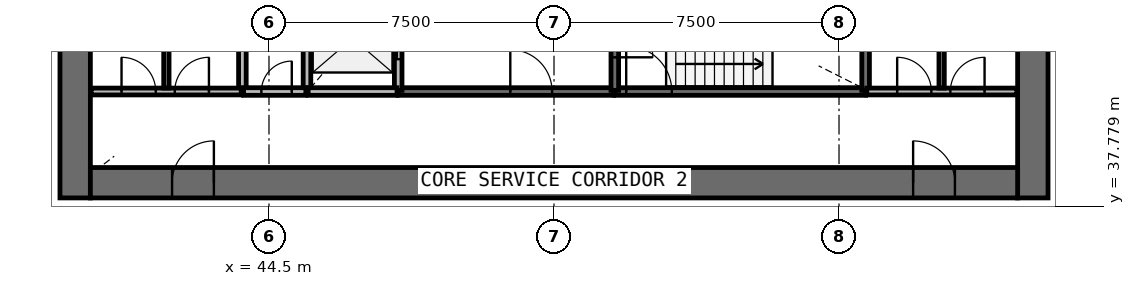
"""IFC4 building model, lengths in metres.
Left out: names, types, materials, properties, quantities, classifications, styles, units other than length and angle.
Written with IfcOpenShell. Run it as: python <this file> out.ifc"""

import sys

from ifc_helpers import new_model, si_unit, direction, frame, frame_2d, origin, place, context, subcontext, project, spatial, rectangle, extrude, source, transform, mapped, element, fill, save


model = new_model("IFC4")
c1 = context("Model", 3, precision=1e-05, world=origin(), true_north=direction((0.0, 1.0)))
c2 = subcontext(c1, "Body", "Model", "MODEL_VIEW")
j1 = project(units=[si_unit("LENGTHUNIT", "METRE"), si_unit("PLANEANGLEUNIT", "RADIAN")], contexts=[c1])
p1 = place(None, origin())
s1 = spatial("IfcSite", under=j1, at=p1, CompositionType="ELEMENT")
p2 = place(p1, origin())
s2 = spatial("IfcBuilding", under=s1, at=p2, CompositionType="ELEMENT")
p3 = place(p2, frame((0.0, 0.0, 88.0)))
s3 = spatial("IfcBuildingStorey", under=s2, at=p3, CompositionType="ELEMENT", Elevation=88.0)
p4 = place(p3, frame((64.6, 38.0, 0.0), z_axis=(0.0, 0.0, 1.0), x_axis=(0.0, 1.0, 0.0)))
e1 = element("IfcWall", 1, at=p4, inside=s3, PredefinedType="SHEAR", context=c2, shape_type="SweptSolid", body=[
    extrude(rectangle(XDim=20.0, YDim=0.8, at=frame_2d((10.0, 0.0))), origin(), (0.0, 0.0, 1.0), 4.1),
])
p5 = place(p4, frame((9.1, 0.0, 0.0)))
e2 = element("IfcOpeningElement", 2, at=p5, cuts=e1, PredefinedType="OPENING", context=c2, shape_type="SweptSolid", body=[
    extrude(rectangle(XDim=1.8, YDim=2.1, at=frame_2d((0.9, 1.05))), frame((0.0, 0.41, 0.0), z_axis=(0.0, -1.0, 0.0), x_axis=(1.0, 0.0, 0.0)), (0.0, 0.0, 1.0), 0.82),
])
p6 = place(p3, frame((39.4, 58.0, 0.0), z_axis=(0.0, 0.0, 1.0), x_axis=(0.0, -1.0, 0.0)))
e3 = element("IfcWall", 3, at=p6, inside=s3, PredefinedType="SHEAR", context=c2, shape_type="SweptSolid", body=[
    extrude(rectangle(XDim=20.0, YDim=0.8, at=frame_2d((10.0, 0.0))), origin(), (0.0, 0.0, 1.0), 4.1),
])
p7 = place(p6, frame((9.1, 0.0, 0.0)))
e4 = element("IfcOpeningElement", 4, at=p7, cuts=e3, PredefinedType="OPENING", context=c2, shape_type="SweptSolid", body=[
    extrude(rectangle(XDim=1.8, YDim=2.1, at=frame_2d((0.9, 1.05))), frame((0.0, 0.41, 0.0), z_axis=(0.0, -1.0, 0.0), x_axis=(1.0, 0.0, 0.0)), (0.0, 0.0, 1.0), 0.82),
])
p8 = place(p3, frame((39.8, 38.4, 0.0), z_axis=(0.0, 0.0, 1.0), x_axis=(1.0, 0.0, 0.0)))
e5 = element("IfcWall", 5, at=p8, inside=s3, PredefinedType="SHEAR", context=c2, shape_type="SweptSolid", body=[
    extrude(rectangle(XDim=24.4, YDim=0.8, at=frame_2d((12.2, 0.0))), origin(), (0.0, 0.0, 1.0), 4.1),
])
p9 = place(p8, frame((21.65, 0.0, 0.0)))
e6 = element("IfcOpeningElement", 6, at=p9, cuts=e5, PredefinedType="OPENING", context=c2, shape_type="SweptSolid", body=[
    extrude(rectangle(XDim=1.1, YDim=2.1, at=frame_2d((0.55, 1.05))), frame((0.0, 0.41, 0.0), z_axis=(0.0, -1.0, 0.0), x_axis=(1.0, 0.0, 0.0)), (0.0, 0.0, 1.0), 0.82),
])
p10 = place(p8, frame((2.15, 0.0, 0.0)))
e7 = element("IfcOpeningElement", 7, at=p10, cuts=e5, PredefinedType="OPENING", context=c2, shape_type="SweptSolid", body=[
    extrude(rectangle(XDim=1.1, YDim=2.1, at=frame_2d((0.55, 1.05))), frame((0.0, 0.41, 0.0), z_axis=(0.0, -1.0, 0.0), x_axis=(1.0, 0.0, 0.0)), (0.0, 0.0, 1.0), 0.82),
])
p11 = place(p3, frame((53.6, 40.8, 0.0), z_axis=(0.0, 0.0, 1.0), x_axis=(1.0, 0.0, 0.0)))
e8 = element("IfcWall", 8, at=p11, inside=s3, PredefinedType="SOLIDWALL", context=c2, shape_type="SweptSolid", body=[
    extrude(rectangle(XDim=6.6, YDim=0.2, at=frame_2d((3.3, 0.0))), origin(), (0.0, 0.0, 1.0), 3.7),
])
p12 = place(p11, frame((0.3, 0.0, 0.0)))
e9 = element("IfcOpeningElement", 9, at=p12, cuts=e8, PredefinedType="OPENING", context=c2, shape_type="SweptSolid", body=[
    extrude(rectangle(XDim=1.2, YDim=2.1, at=frame_2d((0.6, 1.05))), frame((0.0, 0.11, 0.0), z_axis=(0.0, -1.0, 0.0), x_axis=(1.0, 0.0, 0.0)), (0.0, 0.0, 1.0), 0.22),
])
p13 = place(p3, frame((47.9, 40.8, 0.0), z_axis=(0.0, 0.0, 1.0), x_axis=(1.0, 0.0, 0.0)))
e10 = element("IfcWall", 10, at=p13, inside=s3, PredefinedType="SOLIDWALL", context=c2, shape_type="SweptSolid", body=[
    extrude(rectangle(XDim=5.67, YDim=0.2, at=frame_2d((2.835, 0.0))), origin(), (0.0, 0.0, 1.0), 3.7),
])
p14 = place(p13, frame((2.95, 0.0, 0.0)))
e11 = element("IfcOpeningElement", 11, at=p14, cuts=e10, PredefinedType="OPENING", context=c2, shape_type="SweptSolid", body=[
    extrude(rectangle(XDim=1.1, YDim=2.1, at=frame_2d((0.55, 1.05))), frame((0.0, 0.11, 0.0), z_axis=(0.0, -1.0, 0.0), x_axis=(1.0, 0.0, 0.0)), (0.0, 0.0, 1.0), 0.22),
])
for number, where, z_axis, x_axis in (
    (12, (43.8, 43.6, 0.0), (0.0, 0.0, 1.0), (0.0, -1.0, 0.0)),
    (13, (45.5, 43.6, 0.0), (0.0, 0.0, 1.0), (0.0, -1.0, 0.0)),
):
    element("IfcWall", number, at=place(p3, frame(where, z_axis=z_axis, x_axis=x_axis)), inside=s3, PredefinedType="SOLIDWALL", context=c2, shape_type="SweptSolid", body=[
        extrude(rectangle(XDim=2.8, YDim=0.2, at=frame_2d((1.4, 0.0))), origin(), (0.0, 0.0, 1.0), 3.7),
    ])
p15 = place(p3, frame((47.9, 40.83, 0.0), z_axis=(0.0, 0.0, 1.0), x_axis=(0.0, 1.0, 0.0)))
e14 = element("IfcWall", 14, at=p15, inside=s3, PredefinedType="SOLIDWALL", context=c2, shape_type="SweptSolid", body=[
    extrude(rectangle(XDim=2.77, YDim=0.2, at=frame_2d((1.385, 0.0))), origin(), (0.0, 0.0, 1.0), 3.7),
])
p16 = place(p15, frame((0.82, 0.0, 0.0)))
e15 = element("IfcOpeningElement", 15, at=p16, cuts=e14, PredefinedType="OPENING", context=c2, shape_type="SweptSolid", body=[
    extrude(rectangle(XDim=1.1, YDim=2.1, at=frame_2d((0.55, 1.05))), frame((0.0, 0.11, 0.0), z_axis=(0.0, -1.0, 0.0), x_axis=(1.0, 0.0, 0.0)), (0.0, 0.0, 1.0), 0.22),
])
p17 = place(p3, frame((60.2, 40.83, 0.0), z_axis=(0.0, 0.0, 1.0), x_axis=(0.0, 1.0, 0.0)))
e16 = element("IfcWall", 16, at=p17, inside=s3, PredefinedType="SOLIDWALL", context=c2, shape_type="SweptSolid", body=[
    extrude(rectangle(XDim=2.77, YDim=0.2, at=frame_2d((1.385, 0.0))), origin(), (0.0, 0.0, 1.0), 3.7),
])
p18 = place(p3, frame((53.6, 43.6, 0.0), z_axis=(0.0, 0.0, 1.0), x_axis=(0.0, -1.0, 0.0)))
e17 = element("IfcWall", 17, at=p18, inside=s3, PredefinedType="SOLIDWALL", context=c2, shape_type="SweptSolid", body=[
    extrude(rectangle(XDim=2.77, YDim=0.2, at=frame_2d((1.385, 0.0))), origin(), (0.0, 0.0, 1.0), 3.7),
])
p19 = place(p18, frame((0.9, 0.0, 0.0)))
e18 = element("IfcOpeningElement", 18, at=p19, cuts=e17, PredefinedType="OPENING", context=c2, shape_type="SweptSolid", body=[
    extrude(rectangle(XDim=1.0, YDim=2.1, at=frame_2d((0.5, 1.05))), frame((0.0, 0.11, 0.0), z_axis=(0.0, -1.0, 0.0), x_axis=(1.0, 0.0, 0.0)), (0.0, 0.0, 1.0), 0.22),
])
p20 = place(p3, frame((45.53, 40.8, 0.0), z_axis=(0.0, 0.0, 1.0), x_axis=(1.0, 0.0, 0.0)))
e19 = element("IfcWall", 19, at=p20, inside=s3, PredefinedType="SOLIDWALL", context=c2, shape_type="SweptSolid", body=[
    extrude(rectangle(XDim=2.34, YDim=0.2, at=frame_2d((1.17, 0.0))), origin(), (0.0, 0.0, 1.0), 3.7),
])
p21 = place(p3, frame((43.83, 40.8, 0.0), z_axis=(0.0, 0.0, 1.0), x_axis=(1.0, 0.0, 0.0)))
e20 = element("IfcWall", 20, at=p21, inside=s3, PredefinedType="SOLIDWALL", context=c2, shape_type="SweptSolid", body=[
    extrude(rectangle(XDim=1.64, YDim=0.2, at=frame_2d((0.82, 0.0))), origin(), (0.0, 0.0, 1.0), 3.7),
])
p22 = place(p21, frame((0.47, 0.0, 0.0)))
e21 = element("IfcOpeningElement", 21, at=p22, cuts=e20, PredefinedType="OPENING", context=c2, shape_type="SweptSolid", body=[
    extrude(rectangle(XDim=0.8, YDim=2.1, at=frame_2d((0.4, 1.05))), frame((0.0, 0.11, 0.0), z_axis=(0.0, -1.0, 0.0), x_axis=(1.0, 0.0, 0.0)), (0.0, 0.0, 1.0), 0.22),
])
p23 = place(p3, frame((60.23, 40.8, 0.0), z_axis=(0.0, 0.0, 1.0), x_axis=(1.0, 0.0, 0.0)))
e22 = element("IfcWall", 22, at=p23, inside=s3, PredefinedType="PARTITIONING", context=c2, shape_type="SweptSolid", body=[
    extrude(rectangle(XDim=3.95, YDim=0.18, at=frame_2d((1.975, 0.0))), origin(), (0.0, 0.0, 1.0), 3.7),
])
p24 = place(p23, frame((0.8, 0.0, 0.0)))
e23 = element("IfcOpeningElement", 23, at=p24, cuts=e22, PredefinedType="OPENING", context=c2, shape_type="SweptSolid", body=[
    extrude(rectangle(XDim=0.9, YDim=2.1, at=frame_2d((0.45, 1.05))), frame((0.0, 0.1, 0.0), z_axis=(0.0, -1.0, 0.0), x_axis=(1.0, 0.0, 0.0)), (0.0, 0.0, 1.0), 0.2),
])
p25 = place(p23, frame((2.2, 0.0, 0.0)))
e24 = element("IfcOpeningElement", 24, at=p25, cuts=e22, PredefinedType="OPENING", context=c2, shape_type="SweptSolid", body=[
    extrude(rectangle(XDim=0.9, YDim=2.1, at=frame_2d((0.45, 1.05))), frame((0.0, 0.1, 0.0), z_axis=(0.0, -1.0, 0.0), x_axis=(1.0, 0.0, 0.0)), (0.0, 0.0, 1.0), 0.2),
])
p26 = place(p3, frame((39.82, 40.8, 0.0), z_axis=(0.0, 0.0, 1.0), x_axis=(1.0, 0.0, 0.0)))
e25 = element("IfcWall", 25, at=p26, inside=s3, PredefinedType="PARTITIONING", context=c2, shape_type="SweptSolid", body=[
    extrude(rectangle(XDim=3.95, YDim=0.18, at=frame_2d((1.975, 0.0))), origin(), (0.0, 0.0, 1.0), 3.7),
])
p27 = place(p26, frame((0.8, 0.0, 0.0)))
e26 = element("IfcOpeningElement", 26, at=p27, cuts=e25, PredefinedType="OPENING", context=c2, shape_type="SweptSolid", body=[
    extrude(rectangle(XDim=0.9, YDim=2.1, at=frame_2d((0.45, 1.05))), frame((0.0, 0.1, 0.0), z_axis=(0.0, -1.0, 0.0), x_axis=(1.0, 0.0, 0.0)), (0.0, 0.0, 1.0), 0.2),
])
p28 = place(p26, frame((2.2, 0.0, 0.0)))
e27 = element("IfcOpeningElement", 27, at=p28, cuts=e25, PredefinedType="OPENING", context=c2, shape_type="SweptSolid", body=[
    extrude(rectangle(XDim=0.9, YDim=2.1, at=frame_2d((0.45, 1.05))), frame((0.0, 0.1, 0.0), z_axis=(0.0, -1.0, 0.0), x_axis=(1.0, 0.0, 0.0)), (0.0, 0.0, 1.0), 0.2),
])
for number, where, z_axis, x_axis in (
    (28, (41.8, 40.89, 0.0), (0.0, 0.0, 1.0), (0.0, 1.0, 0.0)),
    (29, (62.2, 40.89, 0.0), (0.0, 0.0, 1.0), (0.0, 1.0, 0.0)),
):
    element("IfcWall", number, at=place(p3, frame(where, z_axis=z_axis, x_axis=x_axis)), inside=s3, PredefinedType="PARTITIONING", context=c2, shape_type="SweptSolid", body=[
        extrude(rectangle(XDim=2.71, YDim=0.14, at=frame_2d((1.355, 0.0))), origin(), (0.0, 0.0, 1.0), 2.9),
    ])
m1 = source(origin(), c2, "Body", "SweptSolid", [
    extrude(rectangle(XDim=1.1, YDim=2.1, at=frame_2d((0.55, 1.05))), frame((0.0, 0.025, 0.0), z_axis=(0.0, -1.0, 0.0), x_axis=(1.0, 0.0, 0.0)), (0.0, 0.0, 1.0), 0.05),
])
p29 = place(p16, origin())
e30 = element("IfcDoor", 30, at=p29, inside=s3, OperationType="DOUBLE_DOOR_SLIDING", PredefinedType="USERDEFINED", context=c2, shape_type="MappedRepresentation", body=[
    mapped(m1, transform((0.0, 0.0, 0.0), scale=1.0)),
])
fill(e15, e30)
m2 = source(origin(), c2, "Body", "SweptSolid", [
    extrude(rectangle(XDim=1.2, YDim=2.1, at=frame_2d((0.6, 1.05))), frame((0.0, 0.025, 0.0), z_axis=(0.0, -1.0, 0.0), x_axis=(1.0, 0.0, 0.0)), (0.0, 0.0, 1.0), 0.05),
])
p30 = place(p12, origin())
e31 = element("IfcDoor", 31, at=p30, inside=s3, OperationType="SINGLE_SWING_LEFT", PredefinedType="DOOR", context=c2, shape_type="MappedRepresentation", body=[
    mapped(m2, transform((0.0, 0.0, 0.0), scale=1.0)),
])
fill(e9, e31)
m3 = source(origin(), c2, "Body", "SweptSolid", [
    extrude(rectangle(XDim=1.0, YDim=2.1, at=frame_2d((0.5, 1.05))), frame((0.0, 0.025, 0.0), z_axis=(0.0, -1.0, 0.0), x_axis=(1.0, 0.0, 0.0)), (0.0, 0.0, 1.0), 0.05),
])
p31 = place(p19, origin())
e32 = element("IfcDoor", 32, at=p31, inside=s3, OperationType="SINGLE_SWING_RIGHT", PredefinedType="DOOR", context=c2, shape_type="MappedRepresentation", body=[
    mapped(m3, transform((0.0, 0.0, 0.0), scale=1.0)),
])
fill(e18, e32)
m4 = source(origin(), c2, "Body", "SweptSolid", [
    extrude(rectangle(XDim=1.1, YDim=2.1, at=frame_2d((0.55, 1.05))), frame((0.0, 0.025, 0.0), z_axis=(0.0, -1.0, 0.0), x_axis=(1.0, 0.0, 0.0)), (0.0, 0.0, 1.0), 0.05),
])
p32 = place(p14, origin())
e33 = element("IfcDoor", 33, at=p32, inside=s3, OperationType="SINGLE_SWING_LEFT", PredefinedType="DOOR", context=c2, shape_type="MappedRepresentation", body=[
    mapped(m4, transform((0.0, 0.0, 0.0), scale=1.0)),
])
fill(e11, e33)
m5 = source(origin(), c2, "Body", "SweptSolid", [
    extrude(rectangle(XDim=0.8, YDim=2.1, at=frame_2d((0.4, 1.05))), frame((0.0, 0.025, 0.0), z_axis=(0.0, -1.0, 0.0), x_axis=(1.0, 0.0, 0.0)), (0.0, 0.0, 1.0), 0.05),
])
p33 = place(p22, origin())
e34 = element("IfcDoor", 34, at=p33, inside=s3, OperationType="SINGLE_SWING_RIGHT", PredefinedType="DOOR", context=c2, shape_type="MappedRepresentation", body=[
    mapped(m5, transform((0.0, 0.0, 0.0), scale=1.0)),
])
fill(e21, e34)
m6 = source(origin(), c2, "Body", "SweptSolid", [
    extrude(rectangle(XDim=1.1, YDim=2.1, at=frame_2d((0.55, 1.05))), frame((0.0, 0.025, 0.0), z_axis=(0.0, -1.0, 0.0), x_axis=(1.0, 0.0, 0.0)), (0.0, 0.0, 1.0), 0.05),
])
p34 = place(p9, origin())
e35 = element("IfcDoor", 35, at=p34, inside=s3, OperationType="SINGLE_SWING_LEFT", PredefinedType="DOOR", context=c2, shape_type="MappedRepresentation", body=[
    mapped(m6, transform((0.0, 0.0, 0.0), scale=1.0)),
])
fill(e6, e35)
p35 = place(p10, origin())
e36 = element("IfcDoor", 36, at=p35, inside=s3, OperationType="SINGLE_SWING_RIGHT", PredefinedType="DOOR", context=c2, shape_type="MappedRepresentation", body=[
    mapped(m6, transform((0.0, 0.0, 0.0), scale=1.0)),
])
fill(e7, e36)
m7 = source(origin(), c2, "Body", "SweptSolid", [
    extrude(rectangle(XDim=0.9, YDim=2.1, at=frame_2d((0.45, 1.05))), frame((0.0, 0.025, 0.0), z_axis=(0.0, -1.0, 0.0), x_axis=(1.0, 0.0, 0.0)), (0.0, 0.0, 1.0), 0.05),
])
p36 = place(p27, origin())
e37 = element("IfcDoor", 37, at=p36, inside=s3, OperationType="SINGLE_SWING_LEFT", PredefinedType="DOOR", context=c2, shape_type="MappedRepresentation", body=[
    mapped(m7, transform((0.0, 0.0, 0.0), scale=1.0)),
])
fill(e26, e37)
p37 = place(p28, origin())
e38 = element("IfcDoor", 38, at=p37, inside=s3, OperationType="SINGLE_SWING_RIGHT", PredefinedType="DOOR", context=c2, shape_type="MappedRepresentation", body=[
    mapped(m7, transform((0.0, 0.0, 0.0), scale=1.0)),
])
fill(e27, e38)
p38 = place(p24, origin())
e39 = element("IfcDoor", 39, at=p38, inside=s3, OperationType="SINGLE_SWING_LEFT", PredefinedType="DOOR", context=c2, shape_type="MappedRepresentation", body=[
    mapped(m7, transform((0.0, 0.0, 0.0), scale=1.0)),
])
fill(e23, e39)
p39 = place(p25, origin())
e40 = element("IfcDoor", 40, at=p39, inside=s3, OperationType="SINGLE_SWING_RIGHT", PredefinedType="DOOR", context=c2, shape_type="MappedRepresentation", body=[
    mapped(m7, transform((0.0, 0.0, 0.0), scale=1.0)),
])
fill(e24, e40)
save(model, sys.argv[1])
